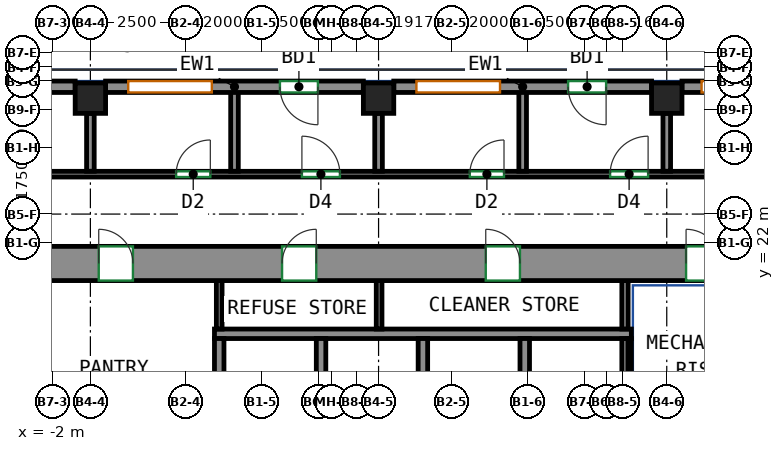
"""IFC4 building model, lengths in metres.
Left out: names, types, materials, properties, quantities, classifications, styles, units other than length and angle.
Written with IfcOpenShell. Run it as: python <this file> out.ifc"""

import sys

from ifc_helpers import new_model, si_unit, direction, frame, frame_2d, origin, origin_2d, place, context, subcontext, project, spatial, rectangle, extrude, source, transform, mapped, element, fill, save


model = new_model("IFC4")
c1 = context("Model", 3, precision=1e-05, world=origin(), true_north=direction((0.0, 1.0)))
c2 = subcontext(c1, "Body", "Model", "MODEL_VIEW")
j1 = project(units=[si_unit("LENGTHUNIT", "METRE"), si_unit("PLANEANGLEUNIT", "RADIAN")], contexts=[c1])
p1 = place(None, origin())
s1 = spatial("IfcSite", under=j1, at=p1, CompositionType="ELEMENT")
p2 = place(p1, origin())
s2 = spatial("IfcBuilding", under=s1, at=p2, CompositionType="ELEMENT")
p3 = place(p2, frame((0.0, 0.0, 168.5)))
s3 = spatial("IfcBuildingStorey", under=s2, at=p3, CompositionType="ELEMENT", Elevation=168.5)
m1 = source(origin(), c2, "Body", "SweptSolid", [
    extrude(rectangle(XDim=0.8, YDim=0.8, at=origin_2d()), origin(), (0.0, 0.0, 1.0), 3.12),
])
for number, where, z_axis, x_axis in (
    (1, (-1.0, 25.8, 0.0), (0.0, 0.0, 1.0), (1.0, 0.0, 0.0)),
    (2, (6.583, 25.8, 0.0), (0.0, 0.0, 1.0), (1.0, 0.0, 0.0)),
    (3, (14.167, 25.8, 0.0), (0.0, 0.0, 1.0), (1.0, 0.0, 0.0)),
):
    element("IfcColumn", number, at=place(p3, frame(where, z_axis=z_axis, x_axis=x_axis)), inside=s3, PredefinedType="COLUMN", context=c2, shape_type="MappedRepresentation", body=[
        mapped(m1, transform((0.0, 0.0, 0.0))),
    ])
m2 = source(origin(), c2, "Body", "SweptSolid", [
    extrude(rectangle(XDim=33.9, YDim=0.9, at=frame_2d((16.95, 0.0))), origin(), (0.0, 0.0, 1.0), 3.12),
])
p4 = place(p3, frame((-15.9, 21.45, 0.0), z_axis=(0.0, 0.0, 1.0), x_axis=(1.0, 0.0, 0.0)))
e4 = element("IfcWall", 4, at=p4, inside=s3, PredefinedType="SHEAR", context=c2, shape_type="MappedRepresentation", body=[
    mapped(m2, transform((0.0, 0.0, 0.0))),
])
p5 = place(p4, frame((8.42, 0.0, 0.0)))
e5 = element("IfcOpeningElement", 5, at=p5, cuts=e4, PredefinedType="OPENING", context=c2, shape_type="SweptSolid", body=[
    extrude(rectangle(XDim=0.9, YDim=2.1, at=frame_2d((0.45, 1.05))), frame((0.0, 0.46, 0.0), z_axis=(0.0, -1.0, 0.0), x_axis=(1.0, 0.0, 0.0)), (0.0, 0.0, 1.0), 0.92),
])
p6 = place(p4, frame((15.12, 0.0, 0.0)))
e6 = element("IfcOpeningElement", 6, at=p6, cuts=e4, PredefinedType="OPENING", context=c2, shape_type="SweptSolid", body=[
    extrude(rectangle(XDim=0.9, YDim=2.1, at=frame_2d((0.45, 1.05))), frame((0.0, 0.46, 0.0), z_axis=(0.0, -1.0, 0.0), x_axis=(1.0, 0.0, 0.0)), (0.0, 0.0, 1.0), 0.92),
])
p7 = place(p4, frame((19.944, 0.0, 0.0)))
e7 = element("IfcOpeningElement", 7, at=p7, cuts=e4, PredefinedType="OPENING", context=c2, shape_type="SweptSolid", body=[
    extrude(rectangle(XDim=0.9, YDim=2.1, at=frame_2d((0.45, 1.05))), frame((0.0, 0.46, 0.0), z_axis=(0.0, -1.0, 0.0), x_axis=(1.0, 0.0, 0.0)), (0.0, 0.0, 1.0), 0.92),
])
p8 = place(p4, frame((25.304, 0.0, 0.0)))
e8 = element("IfcOpeningElement", 8, at=p8, cuts=e4, PredefinedType="OPENING", context=c2, shape_type="SweptSolid", body=[
    extrude(rectangle(XDim=0.9, YDim=2.1, at=frame_2d((0.45, 1.05))), frame((0.0, 0.46, 0.0), z_axis=(0.0, -1.0, 0.0), x_axis=(1.0, 0.0, 0.0)), (0.0, 0.0, 1.0), 0.92),
])
p9 = place(p4, frame((2.425, 0.0, 0.0)))
e9 = element("IfcOpeningElement", 9, at=p9, cuts=e4, PredefinedType="OPENING", context=c2, shape_type="SweptSolid", body=[
    extrude(rectangle(XDim=0.9, YDim=2.1, at=frame_2d((0.45, 1.05))), frame((0.0, 0.46, 0.0), z_axis=(0.0, -1.0, 0.0), x_axis=(1.0, 0.0, 0.0)), (0.0, 0.0, 1.0), 0.92),
])
p10 = place(p4, frame((30.575, 0.0, 0.0)))
e10 = element("IfcOpeningElement", 10, at=p10, cuts=e4, PredefinedType="OPENING", context=c2, shape_type="SweptSolid", body=[
    extrude(rectangle(XDim=0.9, YDim=2.1, at=frame_2d((0.45, 1.05))), frame((0.0, 0.46, 0.0), z_axis=(0.0, -1.0, 0.0), x_axis=(1.0, 0.0, 0.0)), (0.0, 0.0, 1.0), 0.92),
])
m3 = source(origin(), c2, "Body", "SweptSolid", [
    extrude(rectangle(XDim=6.465, YDim=0.3, at=frame_2d((3.232, 0.0))), origin(), (0.0, 0.0, 1.0), 3.12),
])
p11 = place(p3, frame((21.032, 26.1, 0.0), z_axis=(0.0, 0.0, 1.0), x_axis=(-1.0, 0.0, 0.0)))
e11 = element("IfcWall", 11, at=p11, inside=s3, PredefinedType="SOLIDWALL", context=c2, shape_type="MappedRepresentation", body=[
    mapped(m3, transform((0.0, 0.0, 0.0))),
])
p12 = place(p11, frame((1.116, 0.0, 0.0)))
e12 = element("IfcOpeningElement", 12, at=p12, cuts=e11, PredefinedType="OPENING", context=c2, shape_type="SweptSolid", body=[
    extrude(rectangle(XDim=1.0, YDim=2.1, at=frame_2d((0.5, 1.05))), frame((0.0, 0.16, 0.0), z_axis=(0.0, -1.0, 0.0), x_axis=(1.0, 0.0, 0.0)), (0.0, 0.0, 1.0), 0.32),
])
p13 = place(p11, frame((3.749, 0.0, 0.85)))
e13 = element("IfcOpeningElement", 13, at=p13, cuts=e11, PredefinedType="OPENING", context=c2, shape_type="SweptSolid", body=[
    extrude(rectangle(XDim=2.2, YDim=1.95, at=frame_2d((1.1, 0.975))), frame((0.0, 0.16, 0.0), z_axis=(0.0, -1.0, 0.0), x_axis=(1.0, 0.0, 0.0)), (0.0, 0.0, 1.0), 0.32),
])
m4 = source(origin(), c2, "Body", "SweptSolid", [
    extrude(rectangle(XDim=6.783, YDim=0.3, at=frame_2d((3.392, 0.0))), origin(), (0.0, 0.0, 1.0), 3.12),
])
p14 = place(p3, frame((13.767, 26.1, 0.0), z_axis=(0.0, 0.0, 1.0), x_axis=(-1.0, 0.0, 0.0)))
e14 = element("IfcWall", 14, at=p14, inside=s3, PredefinedType="SOLIDWALL", context=c2, shape_type="MappedRepresentation", body=[
    mapped(m4, transform((0.0, 0.0, 0.0))),
])
p15 = place(p14, frame((1.196, 0.0, 0.0)))
e15 = element("IfcOpeningElement", 15, at=p15, cuts=e14, PredefinedType="OPENING", context=c2, shape_type="SweptSolid", body=[
    extrude(rectangle(XDim=1.0, YDim=2.1, at=frame_2d((0.5, 1.05))), frame((0.0, 0.16, 0.0), z_axis=(0.0, -1.0, 0.0), x_axis=(1.0, 0.0, 0.0)), (0.0, 0.0, 1.0), 0.32),
])
p16 = place(p14, frame((3.988, 0.0, 0.85)))
e16 = element("IfcOpeningElement", 16, at=p16, cuts=e14, PredefinedType="OPENING", context=c2, shape_type="SweptSolid", body=[
    extrude(rectangle(XDim=2.2, YDim=1.95, at=frame_2d((1.1, 0.975))), frame((0.0, 0.16, 0.0), z_axis=(0.0, -1.0, 0.0), x_axis=(1.0, 0.0, 0.0)), (0.0, 0.0, 1.0), 0.32),
])
m5 = source(origin(), c2, "Body", "SweptSolid", [
    extrude(rectangle(XDim=6.783, YDim=0.3, at=frame_2d((3.392, 0.0))), origin(), (0.0, 0.0, 1.0), 3.12),
])
p17 = place(p3, frame((6.183, 26.1, 0.0), z_axis=(0.0, 0.0, 1.0), x_axis=(-1.0, 0.0, 0.0)))
e17 = element("IfcWall", 17, at=p17, inside=s3, PredefinedType="SOLIDWALL", context=c2, shape_type="MappedRepresentation", body=[
    mapped(m5, transform((0.0, 0.0, 0.0))),
])
p18 = place(p17, frame((1.196, 0.0, 0.0)))
e18 = element("IfcOpeningElement", 18, at=p18, cuts=e17, PredefinedType="OPENING", context=c2, shape_type="SweptSolid", body=[
    extrude(rectangle(XDim=1.0, YDim=2.1, at=frame_2d((0.5, 1.05))), frame((0.0, 0.16, 0.0), z_axis=(0.0, -1.0, 0.0), x_axis=(1.0, 0.0, 0.0)), (0.0, 0.0, 1.0), 0.32),
])
p19 = place(p17, frame((3.988, 0.0, 0.85)))
e19 = element("IfcOpeningElement", 19, at=p19, cuts=e17, PredefinedType="OPENING", context=c2, shape_type="SweptSolid", body=[
    extrude(rectangle(XDim=2.2, YDim=1.95, at=frame_2d((1.1, 0.975))), frame((0.0, 0.16, 0.0), z_axis=(0.0, -1.0, 0.0), x_axis=(1.0, 0.0, 0.0)), (0.0, 0.0, 1.0), 0.32),
])
p20 = place(p3, frame((-1.4, 26.1, 0.0), z_axis=(0.0, 0.0, 1.0), x_axis=(-1.0, 0.0, 0.0)))
e20 = element("IfcWall", 20, at=p20, inside=s3, PredefinedType="SOLIDWALL", context=c2, shape_type="MappedRepresentation", body=[
    mapped(m5, transform((0.0, 0.0, 0.0))),
])
p21 = place(p20, frame((1.196, 0.0, 0.0)))
e21 = element("IfcOpeningElement", 21, at=p21, cuts=e20, PredefinedType="OPENING", context=c2, shape_type="SweptSolid", body=[
    extrude(rectangle(XDim=1.0, YDim=2.1, at=frame_2d((0.5, 1.05))), frame((0.0, 0.16, 0.0), z_axis=(0.0, -1.0, 0.0), x_axis=(1.0, 0.0, 0.0)), (0.0, 0.0, 1.0), 0.32),
])
p22 = place(p20, frame((3.988, 0.0, 0.85)))
e22 = element("IfcOpeningElement", 22, at=p22, cuts=e20, PredefinedType="OPENING", context=c2, shape_type="SweptSolid", body=[
    extrude(rectangle(XDim=2.2, YDim=1.95, at=frame_2d((1.1, 0.975))), frame((0.0, 0.16, 0.0), z_axis=(0.0, -1.0, 0.0), x_axis=(1.0, 0.0, 0.0)), (0.0, 0.0, 1.0), 0.32),
])
m6 = source(origin(), c2, "Body", "SweptSolid", [
    extrude(rectangle(XDim=10.97, YDim=0.25, at=frame_2d((5.485, 0.0))), origin(), (0.0, 0.0, 1.0), 3.12),
])
p23 = place(p3, frame((2.265, 19.6, 0.0), z_axis=(0.0, 0.0, 1.0), x_axis=(1.0, 0.0, 0.0)))
e23 = element("IfcWall", 23, at=p23, inside=s3, PredefinedType="PARTITIONING", context=c2, shape_type="MappedRepresentation", body=[
    mapped(m6, transform((0.0, 0.0, 0.0))),
])
m7 = source(origin(), c2, "Body", "SweptSolid", [
    extrude(rectangle(XDim=3.275, YDim=0.165, at=frame_2d((1.638, 0.0))), origin(), (0.0, 0.0, 1.0), 3.12),
])
p24 = place(p3, frame((13.067, 16.2, 0.0), z_axis=(0.0, 0.0, 1.0), x_axis=(0.0, 1.0, 0.0)))
e24 = element("IfcWall", 24, at=p24, inside=s3, PredefinedType="PARTITIONING", context=c2, shape_type="MappedRepresentation", body=[
    mapped(m7, transform((0.0, 0.0, 0.0))),
])
m8 = source(origin(), c2, "Body", "SweptSolid", [
    extrude(rectangle(XDim=1.275, YDim=0.165, at=frame_2d((0.637, 0.0))), origin(), (0.0, 0.0, 1.0), 3.12),
])
p25 = place(p3, frame((13.067, 19.725, 0.0), z_axis=(0.0, 0.0, 1.0), x_axis=(0.0, 1.0, 0.0)))
e25 = element("IfcWall", 25, at=p25, inside=s3, PredefinedType="PARTITIONING", context=c2, shape_type="MappedRepresentation", body=[
    mapped(m8, transform((0.0, 0.0, 0.0))),
])
m9 = source(origin(), c2, "Body", "SweptSolid", [
    extrude(rectangle(XDim=3.275, YDim=0.25, at=frame_2d((1.638, 0.0))), origin(), (0.0, 0.0, 1.0), 3.12),
])
p26 = place(p3, frame((10.43, 16.2, 0.0), z_axis=(0.0, 0.0, 1.0), x_axis=(0.0, 1.0, 0.0)))
e26 = element("IfcWall", 26, at=p26, inside=s3, PredefinedType="PARTITIONING", context=c2, shape_type="MappedRepresentation", body=[
    mapped(m9, transform((0.0, 0.0, 0.0))),
])
m10 = source(origin(), c2, "Body", "SweptSolid", [
    extrude(rectangle(XDim=2.725, YDim=0.085, at=frame_2d((1.363, 0.0))), origin(), (0.0, 0.0, 1.0), 3.12),
])
p27 = place(p3, frame((13.192, 16.75, 0.0), z_axis=(0.0, 0.0, 1.0), x_axis=(0.0, 1.0, 0.0)))
e27 = element("IfcWall", 27, at=p27, inside=s3, PredefinedType="PARTITIONING", context=c2, shape_type="MappedRepresentation", body=[
    mapped(m10, transform((0.0, 0.0, 0.0))),
])
for number, where, z_axis, x_axis in (
    (28, (2.39, 16.2, 0.0), (0.0, 0.0, 1.0), (0.0, 1.0, 0.0)),
    (29, (5.07, 16.2, 0.0), (0.0, 0.0, 1.0), (0.0, 1.0, 0.0)),
    (30, (7.75, 16.2, 0.0), (0.0, 0.0, 1.0), (0.0, 1.0, 0.0)),
):
    element("IfcWall", number, at=place(p3, frame(where, z_axis=z_axis, x_axis=x_axis)), inside=s3, PredefinedType="PARTITIONING", context=c2, shape_type="MappedRepresentation", body=[
        mapped(m9, transform((0.0, 0.0, 0.0))),
    ])
m11 = source(origin(), c2, "Body", "SweptSolid", [
    extrude(rectangle(XDim=1.275, YDim=0.15, at=frame_2d((0.637, 0.0))), origin(), (0.0, 0.0, 1.0), 3.12),
])
for number, where, z_axis, x_axis in (
    (31, (2.39, 19.725, 0.0), (0.0, 0.0, 1.0), (0.0, 1.0, 0.0)),
    (32, (6.598, 19.725, 0.0), (0.0, 0.0, 1.0), (0.0, 1.0, 0.0)),
):
    element("IfcWall", number, at=place(p3, frame(where, z_axis=z_axis, x_axis=x_axis)), inside=s3, PredefinedType="PARTITIONING", context=c2, shape_type="MappedRepresentation", body=[
        mapped(m11, transform((0.0, 0.0, 0.0))),
    ])
p28 = place(p3, frame((-20.059, 23.8, 0.0), z_axis=(0.0, 0.0, 1.0), x_axis=(1.0, 0.0, 0.0)))
e33 = element("IfcWall", 33, at=p28, inside=s3, PredefinedType="PARTITIONING", context=c2, shape_type="SweptSolid", body=[
    extrude(rectangle(XDim=41.909, YDim=0.15, at=frame_2d((20.955, 0.0))), origin(), (0.0, 0.0, 1.0), 3.12),
])
p29 = place(p28, frame((2.101, 0.0, 0.0)))
e34 = element("IfcOpeningElement", 34, at=p29, cuts=e33, PredefinedType="OPENING", context=c2, shape_type="SweptSolid", body=[
    extrude(rectangle(XDim=0.9, YDim=2.1, at=frame_2d((0.45, 1.05))), frame((0.0, 0.085, 0.0), z_axis=(0.0, -1.0, 0.0), x_axis=(1.0, 0.0, 0.0)), (0.0, 0.0, 1.0), 0.17),
])
p30 = place(p28, frame((4.585, 0.0, 0.0)))
e35 = element("IfcOpeningElement", 35, at=p30, cuts=e33, PredefinedType="OPENING", context=c2, shape_type="SweptSolid", body=[
    extrude(rectangle(XDim=1.0, YDim=2.1, at=frame_2d((0.5, 1.05))), frame((0.0, 0.085, 0.0), z_axis=(0.0, -1.0, 0.0), x_axis=(1.0, 0.0, 0.0)), (0.0, 0.0, 1.0), 0.17),
])
p31 = place(p28, frame((8.175, 0.0, 0.0)))
e36 = element("IfcOpeningElement", 36, at=p31, cuts=e33, PredefinedType="OPENING", context=c2, shape_type="SweptSolid", body=[
    extrude(rectangle(XDim=0.9, YDim=2.1, at=frame_2d((0.45, 1.05))), frame((0.0, 0.085, 0.0), z_axis=(0.0, -1.0, 0.0), x_axis=(1.0, 0.0, 0.0)), (0.0, 0.0, 1.0), 0.17),
])
p32 = place(p28, frame((13.173, 0.0, 0.0)))
e37 = element("IfcOpeningElement", 37, at=p32, cuts=e33, PredefinedType="OPENING", context=c2, shape_type="SweptSolid", body=[
    extrude(rectangle(XDim=1.0, YDim=2.1, at=frame_2d((0.5, 1.05))), frame((0.0, 0.085, 0.0), z_axis=(0.0, -1.0, 0.0), x_axis=(1.0, 0.0, 0.0)), (0.0, 0.0, 1.0), 0.17),
])
p33 = place(p28, frame((15.658, 0.0, 0.0)))
e38 = element("IfcOpeningElement", 38, at=p33, cuts=e33, PredefinedType="OPENING", context=c2, shape_type="SweptSolid", body=[
    extrude(rectangle(XDim=0.9, YDim=2.1, at=frame_2d((0.45, 1.05))), frame((0.0, 0.085, 0.0), z_axis=(0.0, -1.0, 0.0), x_axis=(1.0, 0.0, 0.0)), (0.0, 0.0, 1.0), 0.17),
])
p34 = place(p28, frame((21.315, 0.0, 0.0)))
e39 = element("IfcOpeningElement", 39, at=p34, cuts=e33, PredefinedType="OPENING", context=c2, shape_type="SweptSolid", body=[
    extrude(rectangle(XDim=0.9, YDim=2.1, at=frame_2d((0.45, 1.05))), frame((0.0, 0.085, 0.0), z_axis=(0.0, -1.0, 0.0), x_axis=(1.0, 0.0, 0.0)), (0.0, 0.0, 1.0), 0.17),
])
p35 = place(p28, frame((24.625, 0.0, 0.0)))
e40 = element("IfcOpeningElement", 40, at=p35, cuts=e33, PredefinedType="OPENING", context=c2, shape_type="SweptSolid", body=[
    extrude(rectangle(XDim=1.0, YDim=2.1, at=frame_2d((0.5, 1.05))), frame((0.0, 0.085, 0.0), z_axis=(0.0, -1.0, 0.0), x_axis=(1.0, 0.0, 0.0)), (0.0, 0.0, 1.0), 0.17),
])
p36 = place(p28, frame((29.043, 0.0, 0.0)))
e41 = element("IfcOpeningElement", 41, at=p36, cuts=e33, PredefinedType="OPENING", context=c2, shape_type="SweptSolid", body=[
    extrude(rectangle(XDim=0.9, YDim=2.1, at=frame_2d((0.45, 1.05))), frame((0.0, 0.085, 0.0), z_axis=(0.0, -1.0, 0.0), x_axis=(1.0, 0.0, 0.0)), (0.0, 0.0, 1.0), 0.17),
])
p37 = place(p28, frame((32.735, 0.0, 0.0)))
e42 = element("IfcOpeningElement", 42, at=p37, cuts=e33, PredefinedType="OPENING", context=c2, shape_type="SweptSolid", body=[
    extrude(rectangle(XDim=1.0, YDim=2.1, at=frame_2d((0.5, 1.05))), frame((0.0, 0.085, 0.0), z_axis=(0.0, -1.0, 0.0), x_axis=(1.0, 0.0, 0.0)), (0.0, 0.0, 1.0), 0.17),
])
p38 = place(p28, frame((36.627, 0.0, 0.0)))
e43 = element("IfcOpeningElement", 43, at=p38, cuts=e33, PredefinedType="OPENING", context=c2, shape_type="SweptSolid", body=[
    extrude(rectangle(XDim=0.9, YDim=2.1, at=frame_2d((0.45, 1.05))), frame((0.0, 0.085, 0.0), z_axis=(0.0, -1.0, 0.0), x_axis=(1.0, 0.0, 0.0)), (0.0, 0.0, 1.0), 0.17),
])
p39 = place(p28, frame((38.808, 0.0, 0.0)))
e44 = element("IfcOpeningElement", 44, at=p39, cuts=e33, PredefinedType="OPENING", context=c2, shape_type="SweptSolid", body=[
    extrude(rectangle(XDim=0.9, YDim=2.1, at=frame_2d((0.45, 1.05))), frame((0.0, 0.085, 0.0), z_axis=(0.0, -1.0, 0.0), x_axis=(1.0, 0.0, 0.0)), (0.0, 0.0, 1.0), 0.17),
])
p40 = place(p3, frame((-1.0, 23.877, 0.0), z_axis=(0.0, 0.0, 1.0), x_axis=(0.0, 1.0, 0.0)))
e45 = element("IfcWall", 45, at=p40, inside=s3, PredefinedType="PARTITIONING", context=c2, shape_type="SweptSolid", body=[
    extrude(rectangle(XDim=1.523, YDim=0.2, at=frame_2d((0.761, 0.0))), origin(), (0.0, 0.0, 1.0), 3.12),
])
p41 = place(p3, frame((2.792, 23.877, 0.0), z_axis=(0.0, 0.0, 1.0), x_axis=(0.0, 1.0, 0.0)))
e46 = element("IfcWall", 46, at=p41, inside=s3, PredefinedType="PARTITIONING", context=c2, shape_type="SweptSolid", body=[
    extrude(rectangle(XDim=2.123, YDim=0.2, at=frame_2d((1.062, 0.0))), origin(), (0.0, 0.0, 1.0), 3.12),
])
p42 = place(p3, frame((6.583, 23.877, 0.0), z_axis=(0.0, 0.0, 1.0), x_axis=(0.0, 1.0, 0.0)))
e47 = element("IfcWall", 47, at=p42, inside=s3, PredefinedType="PARTITIONING", context=c2, shape_type="SweptSolid", body=[
    extrude(rectangle(XDim=1.523, YDim=0.2, at=frame_2d((0.761, 0.0))), origin(), (0.0, 0.0, 1.0), 3.12),
])
p43 = place(p3, frame((10.375, 23.877, 0.0), z_axis=(0.0, 0.0, 1.0), x_axis=(0.0, 1.0, 0.0)))
e48 = element("IfcWall", 48, at=p43, inside=s3, PredefinedType="PARTITIONING", context=c2, shape_type="SweptSolid", body=[
    extrude(rectangle(XDim=2.123, YDim=0.2, at=frame_2d((1.062, 0.0))), origin(), (0.0, 0.0, 1.0), 3.12),
])
p44 = place(p3, frame((14.167, 23.877, 0.0), z_axis=(0.0, 0.0, 1.0), x_axis=(0.0, 1.0, 0.0)))
e49 = element("IfcWall", 49, at=p44, inside=s3, PredefinedType="PARTITIONING", context=c2, shape_type="SweptSolid", body=[
    extrude(rectangle(XDim=1.523, YDim=0.2, at=frame_2d((0.761, 0.0))), origin(), (0.0, 0.0, 1.0), 3.12),
])
p45 = place(p13, origin())
e50 = element("IfcWindow", 50, at=p45, inside=s3, PartitioningType="SINGLE_PANEL", PredefinedType="WINDOW", context=c2, shape_type="SweptSolid", body=[
    extrude(rectangle(XDim=2.2, YDim=1.95, at=frame_2d((1.1, 0.975))), frame((0.0, 0.03, 0.0), z_axis=(0.0, -1.0, 0.0), x_axis=(1.0, 0.0, 0.0)), (0.0, 0.0, 1.0), 0.06),
])
fill(e13, e50)
p46 = place(p15, origin())
e51 = element("IfcDoor", 51, at=p46, inside=s3, OperationType="SINGLE_SWING_LEFT", PredefinedType="DOOR", context=c2, shape_type="SweptSolid", body=[
    extrude(rectangle(XDim=1.0, YDim=2.1, at=frame_2d((0.5, 1.05))), frame((0.0, 0.025, 0.0), z_axis=(0.0, -1.0, 0.0), x_axis=(1.0, 0.0, 0.0)), (0.0, 0.0, 1.0), 0.05),
])
fill(e15, e51)
p47 = place(p16, origin())
e52 = element("IfcWindow", 52, at=p47, inside=s3, PartitioningType="SINGLE_PANEL", PredefinedType="WINDOW", context=c2, shape_type="SweptSolid", body=[
    extrude(rectangle(XDim=2.2, YDim=1.95, at=frame_2d((1.1, 0.975))), frame((0.0, 0.03, 0.0), z_axis=(0.0, -1.0, 0.0), x_axis=(1.0, 0.0, 0.0)), (0.0, 0.0, 1.0), 0.06),
])
fill(e16, e52)
p48 = place(p18, origin())
e53 = element("IfcDoor", 53, at=p48, inside=s3, OperationType="SINGLE_SWING_LEFT", PredefinedType="DOOR", context=c2, shape_type="SweptSolid", body=[
    extrude(rectangle(XDim=1.0, YDim=2.1, at=frame_2d((0.5, 1.05))), frame((0.0, 0.025, 0.0), z_axis=(0.0, -1.0, 0.0), x_axis=(1.0, 0.0, 0.0)), (0.0, 0.0, 1.0), 0.05),
])
fill(e18, e53)
p49 = place(p19, origin())
e54 = element("IfcWindow", 54, at=p49, inside=s3, PartitioningType="SINGLE_PANEL", PredefinedType="WINDOW", context=c2, shape_type="SweptSolid", body=[
    extrude(rectangle(XDim=2.2, YDim=1.95, at=frame_2d((1.1, 0.975))), frame((0.0, 0.03, 0.0), z_axis=(0.0, -1.0, 0.0), x_axis=(1.0, 0.0, 0.0)), (0.0, 0.0, 1.0), 0.06),
])
fill(e19, e54)
p50 = place(p6, origin())
e55 = element("IfcDoor", 55, at=p50, inside=s3, OperationType="SINGLE_SWING_LEFT", PredefinedType="DOOR", context=c2, shape_type="SweptSolid", body=[
    extrude(rectangle(XDim=0.9, YDim=2.1, at=frame_2d((0.45, 1.05))), frame((0.0, -0.305, 0.0), z_axis=(0.0, -1.0, 0.0), x_axis=(1.0, 0.0, 0.0)), (0.0, 0.0, 1.0), 0.05),
])
fill(e6, e55)
p51 = place(p7, origin())
e56 = element("IfcDoor", 56, at=p51, inside=s3, OperationType="SINGLE_SWING_RIGHT", PredefinedType="DOOR", context=c2, shape_type="SweptSolid", body=[
    extrude(rectangle(XDim=0.9, YDim=2.1, at=frame_2d((0.45, 1.05))), frame((0.0, -0.305, 0.0), z_axis=(0.0, -1.0, 0.0), x_axis=(1.0, 0.0, 0.0)), (0.0, 0.0, 1.0), 0.05),
])
fill(e7, e56)
p52 = place(p8, origin())
e57 = element("IfcDoor", 57, at=p52, inside=s3, OperationType="SINGLE_SWING_LEFT", PredefinedType="DOOR", context=c2, shape_type="SweptSolid", body=[
    extrude(rectangle(XDim=0.9, YDim=2.1, at=frame_2d((0.45, 1.05))), frame((0.0, -0.305, 0.0), z_axis=(0.0, -1.0, 0.0), x_axis=(1.0, 0.0, 0.0)), (0.0, 0.0, 1.0), 0.05),
])
fill(e8, e57)
p53 = place(p10, origin())
e58 = element("IfcDoor", 58, at=p53, inside=s3, OperationType="SINGLE_SWING_LEFT", PredefinedType="DOOR", context=c2, shape_type="SweptSolid", body=[
    extrude(rectangle(XDim=0.9, YDim=2.1, at=frame_2d((0.45, 1.05))), frame((0.0, -0.305, 0.0), z_axis=(0.0, -1.0, 0.0), x_axis=(1.0, 0.0, 0.0)), (0.0, 0.0, 1.0), 0.05),
])
fill(e10, e58)
p54 = place(p34, origin())
e59 = element("IfcDoor", 59, at=p54, inside=s3, OperationType="SINGLE_SWING_RIGHT", PredefinedType="DOOR", context=c2, shape_type="SweptSolid", body=[
    extrude(rectangle(XDim=0.9, YDim=2.1, at=frame_2d((0.45, 1.05))), frame((0.0, 0.025, 0.0), z_axis=(0.0, -1.0, 0.0), x_axis=(1.0, 0.0, 0.0)), (0.0, 0.0, 1.0), 0.05),
])
fill(e39, e59)
p55 = place(p35, origin())
e60 = element("IfcDoor", 60, at=p55, inside=s3, OperationType="SINGLE_SWING_LEFT", PredefinedType="DOOR", context=c2, shape_type="SweptSolid", body=[
    extrude(rectangle(XDim=1.0, YDim=2.1, at=frame_2d((0.5, 1.05))), frame((0.0, 0.025, 0.0), z_axis=(0.0, -1.0, 0.0), x_axis=(1.0, 0.0, 0.0)), (0.0, 0.0, 1.0), 0.05),
])
fill(e40, e60)
p56 = place(p36, origin())
e61 = element("IfcDoor", 61, at=p56, inside=s3, OperationType="SINGLE_SWING_RIGHT", PredefinedType="DOOR", context=c2, shape_type="SweptSolid", body=[
    extrude(rectangle(XDim=0.9, YDim=2.1, at=frame_2d((0.45, 1.05))), frame((0.0, 0.025, 0.0), z_axis=(0.0, -1.0, 0.0), x_axis=(1.0, 0.0, 0.0)), (0.0, 0.0, 1.0), 0.05),
])
fill(e41, e61)
p57 = place(p37, origin())
e62 = element("IfcDoor", 62, at=p57, inside=s3, OperationType="SINGLE_SWING_RIGHT", PredefinedType="DOOR", context=c2, shape_type="SweptSolid", body=[
    extrude(rectangle(XDim=1.0, YDim=2.1, at=frame_2d((0.5, 1.05))), frame((0.0, 0.025, 0.0), z_axis=(0.0, -1.0, 0.0), x_axis=(1.0, 0.0, 0.0)), (0.0, 0.0, 1.0), 0.05),
])
fill(e42, e62)
save(model, sys.argv[1])
